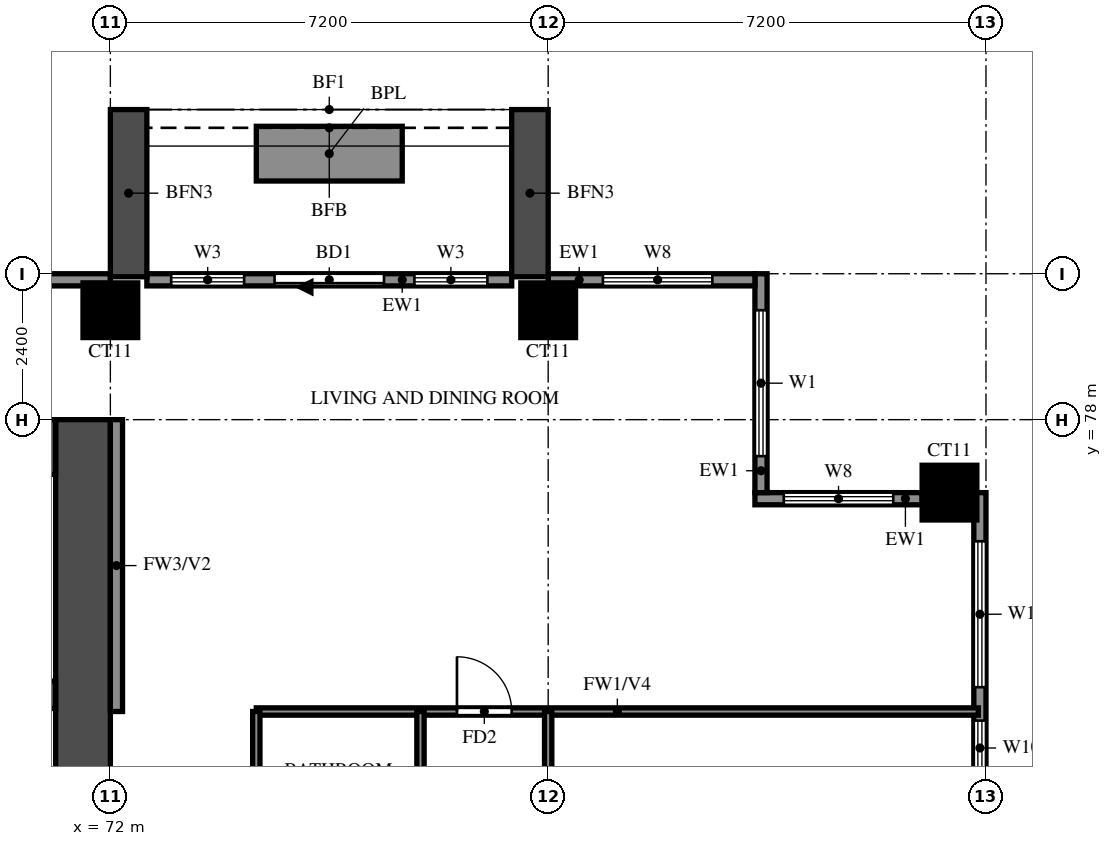
"""IFC4 building model, lengths in metres.
Left out: names, types, materials, properties, quantities, classifications, styles, units other than length and angle.
Written with IfcOpenShell. Run it as: python <this file> out.ifc"""

import sys

from ifc_helpers import new_model, si_unit, direction, frame, frame_2d, origin, origin_2d, place, context, subcontext, project, spatial, rectangle, extrude, source, transform, mapped, element, fill, save


model = new_model("IFC4")
c1 = context("Model", 3, precision=1e-05, world=origin(), true_north=direction((0.0, 1.0)))
c2 = subcontext(c1, "Body", "Model", "MODEL_VIEW")
j1 = project(units=[si_unit("LENGTHUNIT", "METRE"), si_unit("PLANEANGLEUNIT", "RADIAN")], contexts=[c1])
p1 = place(None, origin())
s1 = spatial("IfcSite", under=j1, at=p1, CompositionType="ELEMENT")
p2 = place(p1, origin())
s2 = spatial("IfcBuilding", under=s1, at=p2, CompositionType="ELEMENT")
p3 = place(p2, frame((0.0, 0.0, 93.5)))
s3 = spatial("IfcBuildingStorey", under=s2, at=p3, CompositionType="ELEMENT", Elevation=93.5)
m1 = source(origin(), c2, "Body", "SweptSolid", [
    extrude(rectangle(XDim=0.9, YDim=0.9, at=origin_2d()), origin(), (0.0, 0.0, 1.0), 3.18),
])
for number, where, z_axis, x_axis in (
    (1, (85.8, 76.8, 0.0), (0.0, 0.0, 1.0), (1.0, 0.0, 0.0)),
    (2, (72.0, 79.8, 0.0), (0.0, 0.0, 1.0), (1.0, 0.0, 0.0)),
    (3, (79.2, 79.8, 0.0), (0.0, 0.0, 1.0), (1.0, 0.0, 0.0)),
):
    element("IfcColumn", number, at=place(p3, frame(where, z_axis=z_axis, x_axis=x_axis)), inside=s3, PredefinedType="COLUMN", context=c2, shape_type="MappedRepresentation", body=[
        mapped(m1, transform((0.0, 0.0, 0.0))),
    ])
p4 = place(p3, frame((71.55, 66.0, 0.0), z_axis=(0.0, 0.0, 1.0), x_axis=(0.0, 1.0, 0.0)))
e4 = element("IfcWall", 4, at=p4, inside=s3, PredefinedType="SHEAR", context=c2, shape_type="SweptSolid", body=[
    extrude(rectangle(XDim=12.0, YDim=0.9, at=frame_2d((6.0, 0.0))), origin(), (0.0, 0.0, 1.0), 3.18),
])
p5 = place(p3, frame((29.7, 77.55, 0.0), z_axis=(0.0, 0.0, 1.0), x_axis=(1.0, 0.0, 0.0)))
e5 = element("IfcWall", 5, at=p5, inside=s3, PredefinedType="SHEAR", context=c2, shape_type="SweptSolid", body=[
    extrude(rectangle(XDim=41.4, YDim=0.9, at=frame_2d((20.7, 0.0))), origin(), (0.0, 0.0, 1.0), 3.18),
])
p6 = place(p3, frame((67.925, 73.475, 0.0), z_axis=(0.0, 0.0, 1.0), x_axis=(1.0, 0.0, 0.0)))
e6 = element("IfcWall", 6, at=p6, inside=s3, PredefinedType="SHEAR", context=c2, shape_type="SweptSolid", body=[
    extrude(rectangle(XDim=3.175, YDim=0.45, at=frame_2d((1.587, 0.0))), origin(), (0.0, 0.0, 1.0), 3.18),
])
p7 = place(p3, frame((86.3, 48.2, 0.0), z_axis=(0.0, 0.0, 1.0), x_axis=(0.0, 1.0, 0.0)))
e7 = element("IfcWall", 7, at=p7, inside=s3, PredefinedType="SOLIDWALL", context=c2, shape_type="SweptSolid", body=[
    extrude(rectangle(XDim=28.6, YDim=0.2, at=frame_2d((14.3, 0.0))), origin(), (0.0, 0.0, 1.0), 3.18),
])
p8 = place(p7, frame((4.3, 0.0, 0.0)))
e8 = element("IfcOpeningElement", 8, at=p8, cuts=e7, PredefinedType="OPENING", context=c2, shape_type="SweptSolid", body=[
    extrude(rectangle(XDim=1.8, YDim=2.4, at=frame_2d((0.9, 1.2))), frame((0.0, 0.11, 0.0), z_axis=(0.0, -1.0, 0.0), x_axis=(1.0, 0.0, 0.0)), (0.0, 0.0, 1.0), 0.22),
])
p9 = place(p7, frame((18.7, 0.0, 0.0)))
e9 = element("IfcOpeningElement", 9, at=p9, cuts=e7, PredefinedType="OPENING", context=c2, shape_type="SweptSolid", body=[
    extrude(rectangle(XDim=1.8, YDim=2.4, at=frame_2d((0.9, 1.2))), frame((0.0, 0.11, 0.0), z_axis=(0.0, -1.0, 0.0), x_axis=(1.0, 0.0, 0.0)), (0.0, 0.0, 1.0), 0.22),
])
p10 = place(p7, frame((0.6, 0.0, 0.6)))
e10 = element("IfcOpeningElement", 10, at=p10, cuts=e7, PredefinedType="OPENING", context=c2, shape_type="SweptSolid", body=[
    extrude(rectangle(XDim=1.2, YDim=2.4, at=frame_2d((0.6, 1.2))), frame((0.0, 0.11, 0.0), z_axis=(0.0, -1.0, 0.0), x_axis=(1.0, 0.0, 0.0)), (0.0, 0.0, 1.0), 0.22),
])
p11 = place(p7, frame((7.5, 0.0, 0.6)))
e11 = element("IfcOpeningElement", 11, at=p11, cuts=e7, PredefinedType="OPENING", context=c2, shape_type="SweptSolid", body=[
    extrude(rectangle(XDim=1.2, YDim=2.4, at=frame_2d((0.6, 1.2))), frame((0.0, 0.11, 0.0), z_axis=(0.0, -1.0, 0.0), x_axis=(1.0, 0.0, 0.0)), (0.0, 0.0, 1.0), 0.22),
])
p12 = place(p7, frame((9.55, 0.0, 0.6)))
e12 = element("IfcOpeningElement", 12, at=p12, cuts=e7, PredefinedType="OPENING", context=c2, shape_type="SweptSolid", body=[
    extrude(rectangle(XDim=0.9, YDim=2.4, at=frame_2d((0.45, 1.2))), frame((0.0, 0.11, 0.0), z_axis=(0.0, -1.0, 0.0), x_axis=(1.0, 0.0, 0.0)), (0.0, 0.0, 1.0), 0.22),
])
p13 = place(p7, frame((11.0, 0.0, 0.6)))
e13 = element("IfcOpeningElement", 13, at=p13, cuts=e7, PredefinedType="OPENING", context=c2, shape_type="SweptSolid", body=[
    extrude(rectangle(XDim=2.4, YDim=2.4, at=frame_2d((1.2, 1.2))), frame((0.0, 0.11, 0.0), z_axis=(0.0, -1.0, 0.0), x_axis=(1.0, 0.0, 0.0)), (0.0, 0.0, 1.0), 0.22),
])
p14 = place(p7, frame((15.15, 0.0, 1.5)))
e14 = element("IfcOpeningElement", 14, at=p14, cuts=e7, PredefinedType="OPENING", context=c2, shape_type="SweptSolid", body=[
    extrude(rectangle(XDim=0.9, YDim=0.9, at=frame_2d((0.45, 0.45))), frame((0.0, 0.11, 0.0), z_axis=(0.0, -1.0, 0.0), x_axis=(1.0, 0.0, 0.0)), (0.0, 0.0, 1.0), 0.22),
])
p15 = place(p7, frame((22.05, 0.0, 0.6)))
e15 = element("IfcOpeningElement", 15, at=p15, cuts=e7, PredefinedType="OPENING", context=c2, shape_type="SweptSolid", body=[
    extrude(rectangle(XDim=0.9, YDim=2.4, at=frame_2d((0.45, 1.2))), frame((0.0, 0.11, 0.0), z_axis=(0.0, -1.0, 0.0), x_axis=(1.0, 0.0, 0.0)), (0.0, 0.0, 1.0), 0.22),
])
p16 = place(p7, frame((23.95, 0.0, 0.6)))
e16 = element("IfcOpeningElement", 16, at=p16, cuts=e7, PredefinedType="OPENING", context=c2, shape_type="SweptSolid", body=[
    extrude(rectangle(XDim=0.9, YDim=2.4, at=frame_2d((0.45, 1.2))), frame((0.0, 0.11, 0.0), z_axis=(0.0, -1.0, 0.0), x_axis=(1.0, 0.0, 0.0)), (0.0, 0.0, 1.0), 0.22),
])
p17 = place(p7, frame((25.4, 0.0, 0.6)))
e17 = element("IfcOpeningElement", 17, at=p17, cuts=e7, PredefinedType="OPENING", context=c2, shape_type="SweptSolid", body=[
    extrude(rectangle(XDim=2.4, YDim=2.4, at=frame_2d((1.2, 1.2))), frame((0.0, 0.11, 0.0), z_axis=(0.0, -1.0, 0.0), x_axis=(1.0, 0.0, 0.0)), (0.0, 0.0, 1.0), 0.22),
])
p18 = place(p3, frame((85.35, 76.7, 0.0), z_axis=(0.0, 0.0, 1.0), x_axis=(-1.0, 0.0, 0.0)))
e18 = element("IfcWall", 18, at=p18, inside=s3, PredefinedType="SOLIDWALL", context=c2, shape_type="SweptSolid", body=[
    extrude(rectangle(XDim=2.75, YDim=0.2, at=frame_2d((1.375, 0.0))), origin(), (0.0, 0.0, 1.0), 3.18),
])
p19 = place(p18, frame((0.475, 0.0, 0.6)))
e19 = element("IfcOpeningElement", 19, at=p19, cuts=e18, PredefinedType="OPENING", context=c2, shape_type="SweptSolid", body=[
    extrude(rectangle(XDim=1.8, YDim=2.4, at=frame_2d((0.9, 1.2))), frame((0.0, 0.11, 0.0), z_axis=(0.0, -1.0, 0.0), x_axis=(1.0, 0.0, 0.0)), (0.0, 0.0, 1.0), 0.22),
])
p20 = place(p3, frame((82.7, 76.8, 0.0), z_axis=(0.0, 0.0, 1.0), x_axis=(0.0, 1.0, 0.0)))
e20 = element("IfcWall", 20, at=p20, inside=s3, PredefinedType="SOLIDWALL", context=c2, shape_type="SweptSolid", body=[
    extrude(rectangle(XDim=3.6, YDim=0.2, at=frame_2d((1.8, 0.0))), origin(), (0.0, 0.0, 1.0), 3.18),
])
p21 = place(p20, frame((0.6, 0.0, 0.6)))
e21 = element("IfcOpeningElement", 21, at=p21, cuts=e20, PredefinedType="OPENING", context=c2, shape_type="SweptSolid", body=[
    extrude(rectangle(XDim=2.4, YDim=2.4, at=frame_2d((1.2, 1.2))), frame((0.0, 0.11, 0.0), z_axis=(0.0, -1.0, 0.0), x_axis=(1.0, 0.0, 0.0)), (0.0, 0.0, 1.0), 0.22),
])
p22 = place(p3, frame((82.6, 80.3, 0.0), z_axis=(0.0, 0.0, 1.0), x_axis=(-1.0, 0.0, 0.0)))
e22 = element("IfcWall", 22, at=p22, inside=s3, PredefinedType="SOLIDWALL", context=c2, shape_type="SweptSolid", body=[
    extrude(rectangle(XDim=3.4, YDim=0.2, at=frame_2d((1.7, 0.0))), origin(), (0.0, 0.0, 1.0), 3.18),
])
p23 = place(p22, frame((0.7, 0.0, 0.6)))
e23 = element("IfcOpeningElement", 23, at=p23, cuts=e22, PredefinedType="OPENING", context=c2, shape_type="SweptSolid", body=[
    extrude(rectangle(XDim=1.8, YDim=2.4, at=frame_2d((0.9, 1.2))), frame((0.0, 0.11, 0.0), z_axis=(0.0, -1.0, 0.0), x_axis=(1.0, 0.0, 0.0)), (0.0, 0.0, 1.0), 0.22),
])
p24 = place(p3, frame((78.6, 80.3, 0.0), z_axis=(0.0, 0.0, 1.0), x_axis=(-1.0, 0.0, 0.0)))
e24 = element("IfcWall", 24, at=p24, inside=s3, PredefinedType="SOLIDWALL", context=c2, shape_type="SweptSolid", body=[
    extrude(rectangle(XDim=6.0, YDim=0.2, at=frame_2d((3.0, 0.0))), origin(), (0.0, 0.0, 1.0), 3.18),
])
p25 = place(p24, frame((2.1, 0.0, 0.0)))
e25 = element("IfcOpeningElement", 25, at=p25, cuts=e24, PredefinedType="OPENING", context=c2, shape_type="SweptSolid", body=[
    extrude(rectangle(XDim=1.8, YDim=2.4, at=frame_2d((0.9, 1.2))), frame((0.0, 0.11, 0.0), z_axis=(0.0, -1.0, 0.0), x_axis=(1.0, 0.0, 0.0)), (0.0, 0.0, 1.0), 0.22),
])
p26 = place(p24, frame((0.4, 0.0, 0.6)))
e26 = element("IfcOpeningElement", 26, at=p26, cuts=e24, PredefinedType="OPENING", context=c2, shape_type="SweptSolid", body=[
    extrude(rectangle(XDim=1.2, YDim=2.4, at=frame_2d((0.6, 1.2))), frame((0.0, 0.11, 0.0), z_axis=(0.0, -1.0, 0.0), x_axis=(1.0, 0.0, 0.0)), (0.0, 0.0, 1.0), 0.22),
])
p27 = place(p24, frame((4.4, 0.0, 0.6)))
e27 = element("IfcOpeningElement", 27, at=p27, cuts=e24, PredefinedType="OPENING", context=c2, shape_type="SweptSolid", body=[
    extrude(rectangle(XDim=1.2, YDim=2.4, at=frame_2d((0.6, 1.2))), frame((0.0, 0.11, 0.0), z_axis=(0.0, -1.0, 0.0), x_axis=(1.0, 0.0, 0.0)), (0.0, 0.0, 1.0), 0.22),
])
p28 = place(p3, frame((72.0, 80.3, 0.0), z_axis=(0.0, 0.0, 1.0), x_axis=(-1.0, 0.0, 0.0)))
e28 = element("IfcWall", 28, at=p28, inside=s3, PredefinedType="SOLIDWALL", context=c2, shape_type="SweptSolid", body=[
    extrude(rectangle(XDim=54.0, YDim=0.2, at=frame_2d((27.0, 0.0))), origin(), (0.0, 0.0, 1.0), 3.18),
])
p29 = place(p28, frame((44.167, 0.0, 0.6)))
e29 = element("IfcOpeningElement", 29, at=p29, cuts=e28, PredefinedType="OPENING", context=c2, shape_type="SweptSolid", body=[
    extrude(rectangle(XDim=2.4, YDim=2.4, at=frame_2d((1.2, 1.2))), frame((0.0, 0.11, 0.0), z_axis=(0.0, -1.0, 0.0), x_axis=(1.0, 0.0, 0.0)), (0.0, 0.0, 1.0), 0.22),
])
p30 = place(p28, frame((47.033, 0.0, 0.6)))
e30 = element("IfcOpeningElement", 30, at=p30, cuts=e28, PredefinedType="OPENING", context=c2, shape_type="SweptSolid", body=[
    extrude(rectangle(XDim=2.4, YDim=2.4, at=frame_2d((1.2, 1.2))), frame((0.0, 0.11, 0.0), z_axis=(0.0, -1.0, 0.0), x_axis=(1.0, 0.0, 0.0)), (0.0, 0.0, 1.0), 0.22),
])
p31 = place(p28, frame((51.4, 0.0, 0.6)))
e31 = element("IfcOpeningElement", 31, at=p31, cuts=e28, PredefinedType="OPENING", context=c2, shape_type="SweptSolid", body=[
    extrude(rectangle(XDim=1.8, YDim=2.4, at=frame_2d((0.9, 1.2))), frame((0.0, 0.11, 0.0), z_axis=(0.0, -1.0, 0.0), x_axis=(1.0, 0.0, 0.0)), (0.0, 0.0, 1.0), 0.22),
])
for number, where, z_axis, x_axis in (
    (32, (78.9, 80.35, 0.0), (0.0, 0.0, 1.0), (0.0, 1.0, 0.0)),
    (33, (72.3, 80.35, 0.0), (0.0, 0.0, 1.0), (0.0, 1.0, 0.0)),
):
    element("IfcWall", number, at=place(p3, frame(where, z_axis=z_axis, x_axis=x_axis)), inside=s3, PredefinedType="SOLIDWALL", context=c2, shape_type="SweptSolid", body=[
        extrude(rectangle(XDim=2.75, YDim=0.6, at=frame_2d((1.375, 0.0))), origin(), (0.0, 0.0, 1.0), 2.85),
    ])
p32 = place(p3, frame((76.8, 82.375, 0.0), z_axis=(0.0, 0.0, 1.0), x_axis=(-1.0, 0.0, 0.0)))
e34 = element("IfcWall", 34, at=p32, inside=s3, PredefinedType="SOLIDWALL", context=c2, shape_type="SweptSolid", body=[
    extrude(rectangle(XDim=2.4, YDim=0.9, at=frame_2d((1.2, 0.0))), origin(), (0.0, 0.0, 1.0), 0.9),
])
p33 = place(p3, frame((72.1, 73.2, 0.0), z_axis=(0.0, 0.0, 1.0), x_axis=(0.0, 1.0, 0.0)))
e35 = element("IfcWall", 35, at=p33, inside=s3, PredefinedType="SOLIDWALL", context=c2, shape_type="SweptSolid", body=[
    extrude(rectangle(XDim=4.8, YDim=0.2, at=frame_2d((2.4, 0.0))), origin(), (0.0, 0.0, 1.0), 3.18),
])
p34 = place(p3, frame((74.4, 73.2, 0.0), z_axis=(0.0, 0.0, 1.0), x_axis=(1.0, 0.0, 0.0)))
e36 = element("IfcWall", 36, at=p34, inside=s3, PredefinedType="PARTITIONING", context=c2, shape_type="SweptSolid", body=[
    extrude(rectangle(XDim=11.875, YDim=0.12, at=frame_2d((5.938, 0.0))), origin(), (0.0, 0.0, 1.0), 2.28),
])
p35 = place(p34, frame((3.3, 0.0, 0.0)))
e37 = element("IfcOpeningElement", 37, at=p35, cuts=e36, PredefinedType="OPENING", context=c2, shape_type="SweptSolid", body=[
    extrude(rectangle(XDim=0.9, YDim=2.1, at=frame_2d((0.45, 1.05))), frame((0.0, 0.07, 0.0), z_axis=(0.0, -1.0, 0.0), x_axis=(1.0, 0.0, 0.0)), (0.0, 0.0, 1.0), 0.14),
])
p36 = place(p3, frame((74.4, 69.2, 0.0), z_axis=(0.0, 0.0, 1.0), x_axis=(0.0, 1.0, 0.0)))
e38 = element("IfcWall", 38, at=p36, inside=s3, PredefinedType="PARTITIONING", context=c2, shape_type="SweptSolid", body=[
    extrude(rectangle(XDim=4.0, YDim=0.12, at=frame_2d((2.0, 0.0))), origin(), (0.0, 0.0, 1.0), 3.18),
])
p37 = place(p3, frame((77.1, 61.2, 0.0), z_axis=(0.0, 0.0, 1.0), x_axis=(0.0, 1.0, 0.0)))
e39 = element("IfcWall", 39, at=p37, inside=s3, PredefinedType="PARTITIONING", context=c2, shape_type="SweptSolid", body=[
    extrude(rectangle(XDim=12.0, YDim=0.12, at=frame_2d((6.0, 0.0))), origin(), (0.0, 0.0, 1.0), 3.18),
])
p38 = place(p37, frame((1.875, 0.0, 0.0)))
e40 = element("IfcOpeningElement", 40, at=p38, cuts=e39, PredefinedType="OPENING", context=c2, shape_type="SweptSolid", body=[
    extrude(rectangle(XDim=0.9, YDim=2.1, at=frame_2d((0.45, 1.05))), frame((0.0, 0.07, 0.0), z_axis=(0.0, -1.0, 0.0), x_axis=(1.0, 0.0, 0.0)), (0.0, 0.0, 1.0), 0.14),
])
p39 = place(p37, frame((5.875, 0.0, 0.0)))
e41 = element("IfcOpeningElement", 41, at=p39, cuts=e39, PredefinedType="OPENING", context=c2, shape_type="SweptSolid", body=[
    extrude(rectangle(XDim=0.9, YDim=2.1, at=frame_2d((0.45, 1.05))), frame((0.0, 0.07, 0.0), z_axis=(0.0, -1.0, 0.0), x_axis=(1.0, 0.0, 0.0)), (0.0, 0.0, 1.0), 0.14),
])
p40 = place(p37, frame((9.6, 0.0, 0.0)))
e42 = element("IfcOpeningElement", 42, at=p40, cuts=e39, PredefinedType="OPENING", context=c2, shape_type="SweptSolid", body=[
    extrude(rectangle(XDim=0.8, YDim=2.1, at=frame_2d((0.4, 1.05))), frame((0.0, 0.07, 0.0), z_axis=(0.0, -1.0, 0.0), x_axis=(1.0, 0.0, 0.0)), (0.0, 0.0, 1.0), 0.14),
])
p41 = place(p3, frame((79.2, 66.0, 0.0), z_axis=(0.0, 0.0, 1.0), x_axis=(0.0, 1.0, 0.0)))
e43 = element("IfcWall", 43, at=p41, inside=s3, PredefinedType="PARTITIONING", context=c2, shape_type="SweptSolid", body=[
    extrude(rectangle(XDim=7.2, YDim=0.12, at=frame_2d((3.6, 0.0))), origin(), (0.0, 0.0, 1.0), 3.18),
])
p42 = place(p41, frame((1.35, 0.0, 0.0)))
e44 = element("IfcOpeningElement", 44, at=p42, cuts=e43, PredefinedType="OPENING", context=c2, shape_type="SweptSolid", body=[
    extrude(rectangle(XDim=0.9, YDim=2.1, at=frame_2d((0.45, 1.05))), frame((0.0, 0.07, 0.0), z_axis=(0.0, -1.0, 0.0), x_axis=(1.0, 0.0, 0.0)), (0.0, 0.0, 1.0), 0.14),
])
p43 = place(p41, frame((4.95, 0.0, 0.0)))
e45 = element("IfcOpeningElement", 45, at=p43, cuts=e43, PredefinedType="OPENING", context=c2, shape_type="SweptSolid", body=[
    extrude(rectangle(XDim=0.9, YDim=2.1, at=frame_2d((0.45, 1.05))), frame((0.0, 0.07, 0.0), z_axis=(0.0, -1.0, 0.0), x_axis=(1.0, 0.0, 0.0)), (0.0, 0.0, 1.0), 0.14),
])
p44 = place(p16, origin())
e46 = element("IfcWindow", 46, at=p44, inside=s3, PartitioningType="SINGLE_PANEL", PredefinedType="WINDOW", context=c2, shape_type="SweptSolid", body=[
    extrude(rectangle(XDim=0.9, YDim=2.4, at=frame_2d((0.45, 1.2))), frame((0.0, 0.03, 0.0), z_axis=(0.0, -1.0, 0.0), x_axis=(1.0, 0.0, 0.0)), (0.0, 0.0, 1.0), 0.06),
])
fill(e16, e46)
p45 = place(p17, origin())
e47 = element("IfcWindow", 47, at=p45, inside=s3, PartitioningType="DOUBLE_PANEL_VERTICAL", PredefinedType="WINDOW", context=c2, shape_type="SweptSolid", body=[
    extrude(rectangle(XDim=2.4, YDim=2.4, at=frame_2d((1.2, 1.2))), frame((0.0, 0.03, 0.0), z_axis=(0.0, -1.0, 0.0), x_axis=(1.0, 0.0, 0.0)), (0.0, 0.0, 1.0), 0.06),
])
fill(e17, e47)
p46 = place(p19, origin())
e48 = element("IfcWindow", 48, at=p46, inside=s3, PartitioningType="DOUBLE_PANEL_VERTICAL", PredefinedType="WINDOW", context=c2, shape_type="SweptSolid", body=[
    extrude(rectangle(XDim=1.8, YDim=2.4, at=frame_2d((0.9, 1.2))), frame((0.0, 0.03, 0.0), z_axis=(0.0, -1.0, 0.0), x_axis=(1.0, 0.0, 0.0)), (0.0, 0.0, 1.0), 0.06),
])
fill(e19, e48)
p47 = place(p21, origin())
e49 = element("IfcWindow", 49, at=p47, inside=s3, PartitioningType="DOUBLE_PANEL_VERTICAL", PredefinedType="WINDOW", context=c2, shape_type="SweptSolid", body=[
    extrude(rectangle(XDim=2.4, YDim=2.4, at=frame_2d((1.2, 1.2))), frame((0.0, 0.03, 0.0), z_axis=(0.0, -1.0, 0.0), x_axis=(1.0, 0.0, 0.0)), (0.0, 0.0, 1.0), 0.06),
])
fill(e21, e49)
p48 = place(p23, origin())
e50 = element("IfcWindow", 50, at=p48, inside=s3, PartitioningType="DOUBLE_PANEL_VERTICAL", PredefinedType="WINDOW", context=c2, shape_type="SweptSolid", body=[
    extrude(rectangle(XDim=1.8, YDim=2.4, at=frame_2d((0.9, 1.2))), frame((0.0, 0.03, 0.0), z_axis=(0.0, -1.0, 0.0), x_axis=(1.0, 0.0, 0.0)), (0.0, 0.0, 1.0), 0.06),
])
fill(e23, e50)
p49 = place(p25, origin())
e51 = element("IfcDoor", 51, at=p49, inside=s3, OperationType="DOUBLE_DOOR_SLIDING", PredefinedType="DOOR", context=c2, shape_type="SweptSolid", body=[
    extrude(rectangle(XDim=1.8, YDim=2.4, at=frame_2d((0.9, 1.2))), frame((0.0, 0.025, 0.0), z_axis=(0.0, -1.0, 0.0), x_axis=(1.0, 0.0, 0.0)), (0.0, 0.0, 1.0), 0.05),
])
fill(e25, e51)
p50 = place(p26, origin())
e52 = element("IfcWindow", 52, at=p50, inside=s3, PartitioningType="SINGLE_PANEL", PredefinedType="WINDOW", context=c2, shape_type="SweptSolid", body=[
    extrude(rectangle(XDim=1.2, YDim=2.4, at=frame_2d((0.6, 1.2))), frame((0.0, 0.03, 0.0), z_axis=(0.0, -1.0, 0.0), x_axis=(1.0, 0.0, 0.0)), (0.0, 0.0, 1.0), 0.06),
])
fill(e26, e52)
p51 = place(p27, origin())
e53 = element("IfcWindow", 53, at=p51, inside=s3, PartitioningType="SINGLE_PANEL", PredefinedType="WINDOW", context=c2, shape_type="SweptSolid", body=[
    extrude(rectangle(XDim=1.2, YDim=2.4, at=frame_2d((0.6, 1.2))), frame((0.0, 0.03, 0.0), z_axis=(0.0, -1.0, 0.0), x_axis=(1.0, 0.0, 0.0)), (0.0, 0.0, 1.0), 0.06),
])
fill(e27, e53)
p52 = place(p35, origin())
e54 = element("IfcDoor", 54, at=p52, inside=s3, OperationType="SINGLE_SWING_RIGHT", PredefinedType="DOOR", context=c2, shape_type="SweptSolid", body=[
    extrude(rectangle(XDim=0.9, YDim=2.1, at=frame_2d((0.45, 1.05))), frame((0.0, 0.025, 0.0), z_axis=(0.0, -1.0, 0.0), x_axis=(1.0, 0.0, 0.0)), (0.0, 0.0, 1.0), 0.05),
])
fill(e37, e54)
save(model, sys.argv[1])
